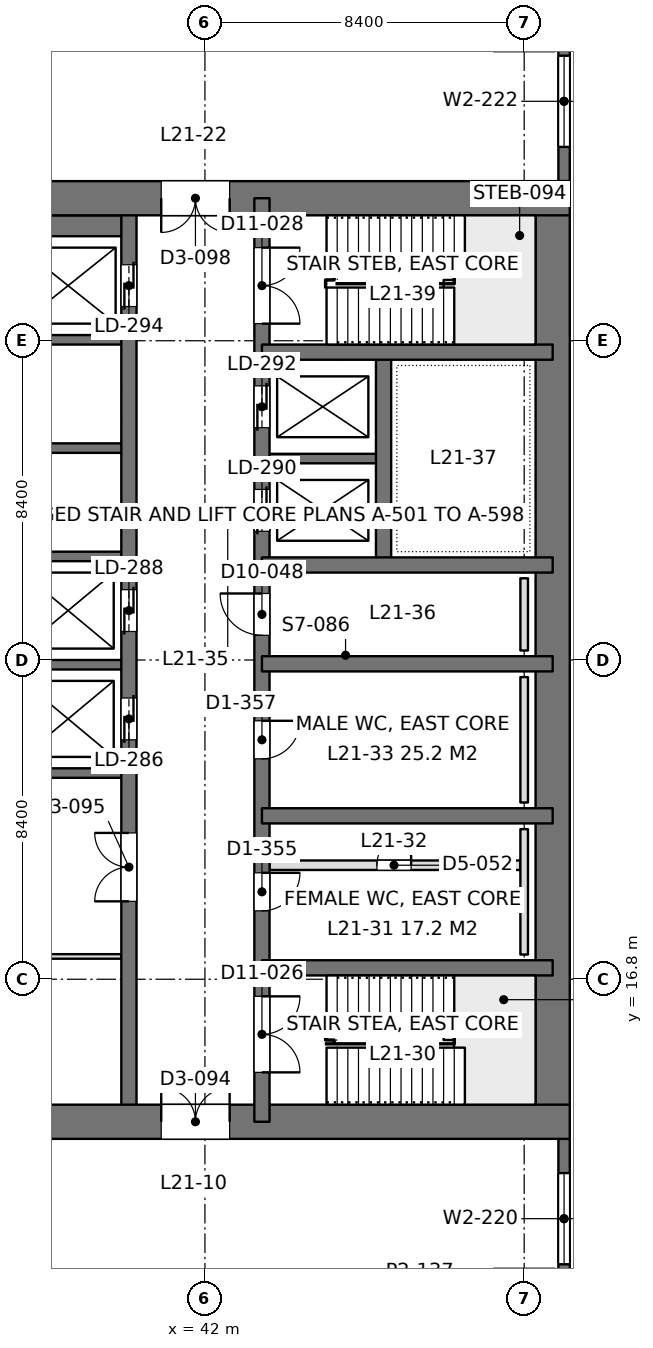
"""IFC4 building model, lengths in metres.
Left out: names, types, materials, properties, quantities, classifications, styles, units other than length and angle.
Written with IfcOpenShell. Run it as: python <this file> out.ifc"""

import sys

from ifc_helpers import new_model, si_unit, direction, frame, frame_2d, origin, place, context, subcontext, project, spatial, rectangle, extrude, element, fill, save


model = new_model("IFC4")
c1 = context("Model", 3, precision=1e-05, world=origin(), true_north=direction((0.0, 1.0)))
c2 = subcontext(c1, "Body", "Model", "MODEL_VIEW")
j1 = project(units=[si_unit("LENGTHUNIT", "METRE"), si_unit("PLANEANGLEUNIT", "RADIAN")], contexts=[c1])
p1 = place(None, origin())
s1 = spatial("IfcSite", under=j1, at=p1, CompositionType="ELEMENT")
p2 = place(p1, origin())
s2 = spatial("IfcBuilding", under=s1, at=p2, CompositionType="ELEMENT")
p3 = place(p2, frame((0.0, 0.0, 96.3)))
s3 = spatial("IfcBuildingStorey", under=s2, at=p3, CompositionType="ELEMENT", Elevation=96.3)
p4 = place(p3, frame((33.6, 13.05, 0.0), z_axis=(0.0, 0.0, 1.0), x_axis=(1.0, 0.0, 0.0)))
e1 = element("IfcWall", 1, at=p4, inside=s3, PredefinedType="SHEAR", context=c2, shape_type="SweptSolid", body=[
    extrude(rectangle(XDim=18.0, YDim=0.9, at=frame_2d((9.0, 0.0))), origin(), (0.0, 0.0, 1.0), 4.5),
])
p5 = place(p4, frame((7.25, 0.0, 0.0)))
e2 = element("IfcOpeningElement", 2, at=p5, cuts=e1, PredefinedType="OPENING", context=c2, shape_type="SweptSolid", body=[
    extrude(rectangle(XDim=1.8, YDim=2.4, at=frame_2d((0.9, 1.2))), frame((0.0, 0.46, 0.0), z_axis=(0.0, -1.0, 0.0), x_axis=(1.0, 0.0, 0.0)), (0.0, 0.0, 1.0), 0.92),
])
p6 = place(p3, frame((33.6, 37.35, 0.0), z_axis=(0.0, 0.0, 1.0), x_axis=(1.0, 0.0, 0.0)))
e3 = element("IfcWall", 3, at=p6, inside=s3, PredefinedType="SHEAR", context=c2, shape_type="SweptSolid", body=[
    extrude(rectangle(XDim=18.0, YDim=0.9, at=frame_2d((9.0, 0.0))), origin(), (0.0, 0.0, 1.0), 4.5),
])
p7 = place(p6, frame((7.25, 0.0, 0.0)))
e4 = element("IfcOpeningElement", 4, at=p7, cuts=e3, PredefinedType="OPENING", context=c2, shape_type="SweptSolid", body=[
    extrude(rectangle(XDim=1.8, YDim=2.4, at=frame_2d((0.9, 1.2))), frame((0.0, 0.46, 0.0), z_axis=(0.0, -1.0, 0.0), x_axis=(1.0, 0.0, 0.0)), (0.0, 0.0, 1.0), 0.92),
])
p8 = place(p3, frame((51.15, 13.05, 0.0), z_axis=(0.0, 0.0, 1.0), x_axis=(0.0, 1.0, 0.0)))
e5 = element("IfcWall", 5, at=p8, inside=s3, PredefinedType="SHEAR", context=c2, shape_type="SweptSolid", body=[
    extrude(rectangle(XDim=24.3, YDim=0.9, at=frame_2d((12.15, 0.0))), origin(), (0.0, 0.0, 1.0), 4.5),
])
p9 = place(p3, frame((43.5, 13.05, 0.0), z_axis=(0.0, 0.0, 1.0), x_axis=(0.0, 1.0, 0.0)))
e6 = element("IfcWall", 6, at=p9, inside=s3, PredefinedType="SHEAR", context=c2, shape_type="SweptSolid", body=[
    extrude(rectangle(XDim=24.3, YDim=0.4, at=frame_2d((12.15, 0.0))), origin(), (0.0, 0.0, 1.0), 4.5),
])
p10 = place(p9, frame((1.3, 0.0, 0.0)))
e7 = element("IfcOpeningElement", 7, at=p10, cuts=e6, PredefinedType="OPENING", context=c2, shape_type="SweptSolid", body=[
    extrude(rectangle(XDim=2.0, YDim=2.2, at=frame_2d((1.0, 1.1))), frame((0.0, 0.21, 0.0), z_axis=(0.0, -1.0, 0.0), x_axis=(1.0, 0.0, 0.0)), (0.0, 0.0, 1.0), 0.42),
])
p11 = place(p9, frame((21.0, 0.0, 0.0)))
e8 = element("IfcOpeningElement", 8, at=p11, cuts=e6, PredefinedType="OPENING", context=c2, shape_type="SweptSolid", body=[
    extrude(rectangle(XDim=2.0, YDim=2.2, at=frame_2d((1.0, 1.1))), frame((0.0, 0.21, 0.0), z_axis=(0.0, -1.0, 0.0), x_axis=(1.0, 0.0, 0.0)), (0.0, 0.0, 1.0), 0.42),
])
p12 = place(p9, frame((5.55, 0.0, 0.0)))
e9 = element("IfcOpeningElement", 9, at=p12, cuts=e6, PredefinedType="OPENING", context=c2, shape_type="SweptSolid", body=[
    extrude(rectangle(XDim=1.0, YDim=2.2, at=frame_2d((0.5, 1.1))), frame((0.0, 0.21, 0.0), z_axis=(0.0, -1.0, 0.0), x_axis=(1.0, 0.0, 0.0)), (0.0, 0.0, 1.0), 0.42),
])
p13 = place(p9, frame((9.55, 0.0, 0.0)))
e10 = element("IfcOpeningElement", 10, at=p13, cuts=e6, PredefinedType="OPENING", context=c2, shape_type="SweptSolid", body=[
    extrude(rectangle(XDim=1.0, YDim=2.2, at=frame_2d((0.5, 1.1))), frame((0.0, 0.21, 0.0), z_axis=(0.0, -1.0, 0.0), x_axis=(1.0, 0.0, 0.0)), (0.0, 0.0, 1.0), 0.42),
])
p14 = place(p9, frame((12.8, 0.0, 0.0)))
e11 = element("IfcOpeningElement", 11, at=p14, cuts=e6, PredefinedType="OPENING", context=c2, shape_type="SweptSolid", body=[
    extrude(rectangle(XDim=1.1, YDim=2.2, at=frame_2d((0.55, 1.1))), frame((0.0, 0.21, 0.0), z_axis=(0.0, -1.0, 0.0), x_axis=(1.0, 0.0, 0.0)), (0.0, 0.0, 1.0), 0.42),
])
p15 = place(p9, frame((15.538, 0.0, 0.0)))
e12 = element("IfcOpeningElement", 12, at=p15, cuts=e6, PredefinedType="OPENING", context=c2, shape_type="SweptSolid", body=[
    extrude(rectangle(XDim=1.1, YDim=2.2, at=frame_2d((0.55, 1.1))), frame((0.0, 0.21, 0.0), z_axis=(0.0, -1.0, 0.0), x_axis=(1.0, 0.0, 0.0)), (0.0, 0.0, 1.0), 0.42),
])
p16 = place(p9, frame((18.262, 0.0, 0.0)))
e13 = element("IfcOpeningElement", 13, at=p16, cuts=e6, PredefinedType="OPENING", context=c2, shape_type="SweptSolid", body=[
    extrude(rectangle(XDim=1.1, YDim=2.2, at=frame_2d((0.55, 1.1))), frame((0.0, 0.21, 0.0), z_axis=(0.0, -1.0, 0.0), x_axis=(1.0, 0.0, 0.0)), (0.0, 0.0, 1.0), 0.42),
])
p17 = place(p3, frame((40.0, 13.05, 0.0), z_axis=(0.0, 0.0, 1.0), x_axis=(0.0, 1.0, 0.0)))
e14 = element("IfcWall", 14, at=p17, inside=s3, PredefinedType="SHEAR", context=c2, shape_type="SweptSolid", body=[
    extrude(rectangle(XDim=24.3, YDim=0.4, at=frame_2d((12.15, 0.0))), origin(), (0.0, 0.0, 1.0), 4.5),
])
p18 = place(p17, frame((10.05, 0.0, 0.0)))
e15 = element("IfcOpeningElement", 15, at=p18, cuts=e14, PredefinedType="OPENING", context=c2, shape_type="SweptSolid", body=[
    extrude(rectangle(XDim=1.1, YDim=2.2, at=frame_2d((0.55, 1.1))), frame((0.0, 0.21, 0.0), z_axis=(0.0, -1.0, 0.0), x_axis=(1.0, 0.0, 0.0)), (0.0, 0.0, 1.0), 0.42),
])
p19 = place(p17, frame((12.9, 0.0, 0.0)))
e16 = element("IfcOpeningElement", 16, at=p19, cuts=e14, PredefinedType="OPENING", context=c2, shape_type="SweptSolid", body=[
    extrude(rectangle(XDim=1.1, YDim=2.2, at=frame_2d((0.55, 1.1))), frame((0.0, 0.21, 0.0), z_axis=(0.0, -1.0, 0.0), x_axis=(1.0, 0.0, 0.0)), (0.0, 0.0, 1.0), 0.42),
])
p20 = place(p17, frame((21.45, 0.0, 0.0)))
e17 = element("IfcOpeningElement", 17, at=p20, cuts=e14, PredefinedType="OPENING", context=c2, shape_type="SweptSolid", body=[
    extrude(rectangle(XDim=1.1, YDim=2.2, at=frame_2d((0.55, 1.1))), frame((0.0, 0.21, 0.0), z_axis=(0.0, -1.0, 0.0), x_axis=(1.0, 0.0, 0.0)), (0.0, 0.0, 1.0), 0.42),
])
p21 = place(p17, frame((5.8, 0.0, 0.0)))
e18 = element("IfcOpeningElement", 18, at=p21, cuts=e14, PredefinedType="OPENING", context=c2, shape_type="SweptSolid", body=[
    extrude(rectangle(XDim=1.8, YDim=2.4, at=frame_2d((0.9, 1.2))), frame((0.0, 0.21, 0.0), z_axis=(0.0, -1.0, 0.0), x_axis=(1.0, 0.0, 0.0)), (0.0, 0.0, 1.0), 0.42),
])
for number, where, z_axis, x_axis in (
    (19, (51.15, 17.1, 0.0), (0.0, 0.0, 1.0), (-1.0, 0.0, 0.0)),
    (20, (51.15, 21.1, 0.0), (0.0, 0.0, 1.0), (-1.0, 0.0, 0.0)),
    (21, (51.15, 25.1, 0.0), (0.0, 0.0, 1.0), (-1.0, 0.0, 0.0)),
    (22, (51.15, 27.7, 0.0), (0.0, 0.0, 1.0), (-1.0, 0.0, 0.0)),
    (23, (51.15, 33.3, 0.0), (0.0, 0.0, 1.0), (-1.0, 0.0, 0.0)),
):
    element("IfcWall", number, at=place(p3, frame(where, z_axis=z_axis, x_axis=x_axis)), inside=s3, PredefinedType="SHEAR", context=c2, shape_type="SweptSolid", body=[
        extrude(rectangle(XDim=7.65, YDim=0.4, at=frame_2d((3.825, 0.0))), origin(), (0.0, 0.0, 1.0), 4.5),
    ])
p22 = place(p3, frame((46.7, 27.7, 0.0), z_axis=(0.0, 0.0, 1.0), x_axis=(0.0, 1.0, 0.0)))
e24 = element("IfcWall", 24, at=p22, inside=s3, PredefinedType="SHEAR", context=c2, shape_type="SweptSolid", body=[
    extrude(rectangle(XDim=5.6, YDim=0.4, at=frame_2d((2.8, 0.0))), origin(), (0.0, 0.0, 1.0), 4.5),
])
p23 = place(p3, frame((46.7, 30.5, 0.0), z_axis=(0.0, 0.0, 1.0), x_axis=(-1.0, 0.0, 0.0)))
e25 = element("IfcWall", 25, at=p23, inside=s3, PredefinedType="SHEAR", context=c2, shape_type="SweptSolid", body=[
    extrude(rectangle(XDim=3.2, YDim=0.25, at=frame_2d((1.6, 0.0))), origin(), (0.0, 0.0, 1.0), 4.5),
])
p24 = place(p3, frame((40.0, 22.225, 0.0), z_axis=(0.0, 0.0, 1.0), x_axis=(-1.0, 0.0, 0.0)))
e26 = element("IfcWall", 26, at=p24, inside=s3, PredefinedType="SHEAR", context=c2, shape_type="SweptSolid", body=[
    extrude(rectangle(XDim=5.95, YDim=0.25, at=frame_2d((2.975, 0.0))), origin(), (0.0, 0.0, 1.0), 4.5),
])
for number, where, z_axis, x_axis in (
    (27, (40.0, 25.075, 0.0), (0.0, 0.0, 1.0), (-1.0, 0.0, 0.0)),
    (28, (40.0, 27.925, 0.0), (0.0, 0.0, 1.0), (-1.0, 0.0, 0.0)),
    (29, (40.0, 30.775, 0.0), (0.0, 0.0, 1.0), (-1.0, 0.0, 0.0)),
    (30, (40.0, 33.625, 0.0), (0.0, 0.0, 1.0), (-1.0, 0.0, 0.0)),
):
    element("IfcWall", number, at=place(p3, frame(where, z_axis=z_axis, x_axis=x_axis)), inside=s3, PredefinedType="SHEAR", context=c2, shape_type="SweptSolid", body=[
        extrude(rectangle(XDim=3.2, YDim=0.25, at=frame_2d((1.6, 0.0))), origin(), (0.0, 0.0, 1.0), 4.5),
    ])
p25 = place(p3, frame((40.0, 36.625, 0.0), z_axis=(0.0, 0.0, 1.0), x_axis=(-1.0, 0.0, 0.0)))
e31 = element("IfcWall", 31, at=p25, inside=s3, PredefinedType="SHEAR", context=c2, shape_type="SweptSolid", body=[
    extrude(rectangle(XDim=3.2, YDim=0.55, at=frame_2d((1.6, 0.0))), origin(), (0.0, 0.0, 1.0), 4.5),
])
p26 = place(p3, frame((51.45, 42.0, 0.0), z_axis=(0.0, 0.0, 1.0), x_axis=(0.0, -1.0, 0.0)))
e32 = element("IfcWall", 32, at=p26, inside=s3, PredefinedType="SOLIDWALL", context=c2, shape_type="SweptSolid", body=[
    extrude(rectangle(XDim=4.2, YDim=0.3, at=frame_2d((2.1, 0.0))), origin(), (0.0, 0.0, 1.0), 4.35),
])
p27 = place(p26, frame((0.9, 0.0, 0.9)))
e33 = element("IfcOpeningElement", 33, at=p27, cuts=e32, PredefinedType="OPENING", context=c2, shape_type="SweptSolid", body=[
    extrude(rectangle(XDim=2.4, YDim=1.9, at=frame_2d((1.2, 0.95))), frame((0.0, 0.16, 0.0), z_axis=(0.0, -1.0, 0.0), x_axis=(1.0, 0.0, 0.0)), (0.0, 0.0, 1.0), 0.32),
])
p28 = place(p3, frame((51.45, 12.6, 0.0), z_axis=(0.0, 0.0, 1.0), x_axis=(0.0, -1.0, 0.0)))
e34 = element("IfcWall", 34, at=p28, inside=s3, PredefinedType="SOLIDWALL", context=c2, shape_type="SweptSolid", body=[
    extrude(rectangle(XDim=4.2, YDim=0.3, at=frame_2d((2.1, 0.0))), origin(), (0.0, 0.0, 1.0), 4.35),
])
p29 = place(p28, frame((0.9, 0.0, 0.9)))
e35 = element("IfcOpeningElement", 35, at=p29, cuts=e34, PredefinedType="OPENING", context=c2, shape_type="SweptSolid", body=[
    extrude(rectangle(XDim=2.4, YDim=1.9, at=frame_2d((1.2, 0.95))), frame((0.0, 0.16, 0.0), z_axis=(0.0, -1.0, 0.0), x_axis=(1.0, 0.0, 0.0)), (0.0, 0.0, 1.0), 0.32),
])
p30 = place(p3, frame((33.898, 17.4, 0.0), z_axis=(0.0, 0.0, 1.0), x_axis=(1.0, 0.0, 0.0)))
e36 = element("IfcWall", 36, at=p30, inside=s3, PredefinedType="PARTITIONING", context=c2, shape_type="SweptSolid", body=[
    extrude(rectangle(XDim=5.904, YDim=0.12, at=frame_2d((2.952, 0.0))), origin(), (0.0, 0.0, 1.0), 3.85),
])
p31 = place(p3, frame((43.7, 19.8, 0.0), z_axis=(0.0, 0.0, 1.0), x_axis=(1.0, 0.0, 0.0)))
e37 = element("IfcWall", 37, at=p31, inside=s3, PredefinedType="PARTITIONING", context=c2, shape_type="SweptSolid", body=[
    extrude(rectangle(XDim=6.6, YDim=0.25, at=frame_2d((3.3, 0.0))), origin(), (0.0, 0.0, 1.0), 4.3),
])
p32 = place(p31, frame((2.825, 0.0, 0.0)))
e38 = element("IfcOpeningElement", 38, at=p32, cuts=e37, PredefinedType="OPENING", context=c2, shape_type="SweptSolid", body=[
    extrude(rectangle(XDim=0.9, YDim=2.2, at=frame_2d((0.45, 1.1))), frame((0.0, 0.135, 0.0), z_axis=(0.0, -1.0, 0.0), x_axis=(1.0, 0.0, 0.0)), (0.0, 0.0, 1.0), 0.27),
])
for number, where, z_axis, x_axis in (
    (39, (50.4, 17.45, 0.0), (0.0, 0.0, 1.0), (0.0, 1.0, 0.0)),
    (40, (50.4, 21.45, 0.0), (0.0, 0.0, 1.0), (0.0, 1.0, 0.0)),
):
    element("IfcWall", number, at=place(p3, frame(where, z_axis=z_axis, x_axis=x_axis)), inside=s3, PredefinedType="PLUMBINGWALL", context=c2, shape_type="SweptSolid", body=[
        extrude(rectangle(XDim=3.3, YDim=0.2, at=frame_2d((1.65, 0.0))), origin(), (0.0, 0.0, 1.0), 1.2),
    ])
p33 = place(p3, frame((50.4, 25.45, 0.0), z_axis=(0.0, 0.0, 1.0), x_axis=(0.0, 1.0, 0.0)))
e41 = element("IfcWall", 41, at=p33, inside=s3, PredefinedType="PLUMBINGWALL", context=c2, shape_type="SweptSolid", body=[
    extrude(rectangle(XDim=1.9, YDim=0.2, at=frame_2d((0.95, 0.0))), origin(), (0.0, 0.0, 1.0), 1.2),
])
p34 = place(p27, origin())
e42 = element("IfcWindow", 42, at=p34, inside=s3, PartitioningType="SINGLE_PANEL", PredefinedType="WINDOW", context=c2, shape_type="SweptSolid", body=[
    extrude(rectangle(XDim=2.4, YDim=1.9, at=frame_2d((1.2, 0.95))), frame((0.0, 0.03, 0.0), z_axis=(0.0, -1.0, 0.0), x_axis=(1.0, 0.0, 0.0)), (0.0, 0.0, 1.0), 0.06),
])
fill(e33, e42)
p35 = place(p29, origin())
e43 = element("IfcWindow", 43, at=p35, inside=s3, PartitioningType="SINGLE_PANEL", PredefinedType="WINDOW", context=c2, shape_type="SweptSolid", body=[
    extrude(rectangle(XDim=2.4, YDim=1.9, at=frame_2d((1.2, 0.95))), frame((0.0, 0.03, 0.0), z_axis=(0.0, -1.0, 0.0), x_axis=(1.0, 0.0, 0.0)), (0.0, 0.0, 1.0), 0.06),
])
fill(e35, e43)
p36 = place(p5, origin())
e44 = element("IfcDoor", 44, at=p36, inside=s3, OperationType="DOUBLE_DOOR_SINGLE_SWING", PredefinedType="DOOR", context=c2, shape_type="SweptSolid", body=[
    extrude(rectangle(XDim=1.8, YDim=2.4, at=frame_2d((0.9, 1.2))), frame((0.0, 0.025, 0.0), z_axis=(0.0, -1.0, 0.0), x_axis=(1.0, 0.0, 0.0)), (0.0, 0.0, 1.0), 0.05),
])
fill(e2, e44)
p37 = place(p7, frame((1.8, 0.0, 0.0), z_axis=(0.0, 0.0, 1.0), x_axis=(-1.0, 0.0, 0.0)))
e45 = element("IfcDoor", 45, at=p37, inside=s3, OperationType="DOUBLE_DOOR_SINGLE_SWING", PredefinedType="DOOR", context=c2, shape_type="SweptSolid", body=[
    extrude(rectangle(XDim=1.8, YDim=2.4, at=frame_2d((0.9, 1.2))), frame((0.0, 0.025, 0.0), z_axis=(0.0, -1.0, 0.0), x_axis=(1.0, 0.0, 0.0)), (0.0, 0.0, 1.0), 0.05),
])
fill(e4, e45)
p38 = place(p10, frame((2.0, 0.0, 0.0), z_axis=(0.0, 0.0, 1.0), x_axis=(-1.0, 0.0, 0.0)))
e46 = element("IfcDoor", 46, at=p38, inside=s3, OperationType="DOUBLE_DOOR_SINGLE_SWING", PredefinedType="DOOR", context=c2, shape_type="SweptSolid", body=[
    extrude(rectangle(XDim=2.0, YDim=2.2, at=frame_2d((1.0, 1.1))), frame((0.0, 0.025, 0.0), z_axis=(0.0, -1.0, 0.0), x_axis=(1.0, 0.0, 0.0)), (0.0, 0.0, 1.0), 0.05),
])
fill(e7, e46)
p39 = place(p11, frame((2.0, 0.0, 0.0), z_axis=(0.0, 0.0, 1.0), x_axis=(-1.0, 0.0, 0.0)))
e47 = element("IfcDoor", 47, at=p39, inside=s3, OperationType="DOUBLE_DOOR_SINGLE_SWING", PredefinedType="DOOR", context=c2, shape_type="SweptSolid", body=[
    extrude(rectangle(XDim=2.0, YDim=2.2, at=frame_2d((1.0, 1.1))), frame((0.0, 0.025, 0.0), z_axis=(0.0, -1.0, 0.0), x_axis=(1.0, 0.0, 0.0)), (0.0, 0.0, 1.0), 0.05),
])
fill(e8, e47)
p40 = place(p12, frame((1.0, 0.0, 0.0), z_axis=(0.0, 0.0, 1.0), x_axis=(-1.0, 0.0, 0.0)))
e48 = element("IfcDoor", 48, at=p40, inside=s3, OperationType="SINGLE_SWING_LEFT", PredefinedType="DOOR", context=c2, shape_type="SweptSolid", body=[
    extrude(rectangle(XDim=1.0, YDim=2.2, at=frame_2d((0.5, 1.1))), frame((0.0, 0.025, 0.0), z_axis=(0.0, -1.0, 0.0), x_axis=(1.0, 0.0, 0.0)), (0.0, 0.0, 1.0), 0.05),
])
fill(e9, e48)
p41 = place(p13, frame((1.0, 0.0, 0.0), z_axis=(0.0, 0.0, 1.0), x_axis=(-1.0, 0.0, 0.0)))
e49 = element("IfcDoor", 49, at=p41, inside=s3, OperationType="SINGLE_SWING_LEFT", PredefinedType="DOOR", context=c2, shape_type="SweptSolid", body=[
    extrude(rectangle(XDim=1.0, YDim=2.2, at=frame_2d((0.5, 1.1))), frame((0.0, 0.025, 0.0), z_axis=(0.0, -1.0, 0.0), x_axis=(1.0, 0.0, 0.0)), (0.0, 0.0, 1.0), 0.05),
])
fill(e10, e49)
p42 = place(p14, origin())
e50 = element("IfcDoor", 50, at=p42, inside=s3, OperationType="SINGLE_SWING_RIGHT", PredefinedType="DOOR", context=c2, shape_type="SweptSolid", body=[
    extrude(rectangle(XDim=1.1, YDim=2.2, at=frame_2d((0.55, 1.1))), frame((0.0, 0.025, 0.0), z_axis=(0.0, -1.0, 0.0), x_axis=(1.0, 0.0, 0.0)), (0.0, 0.0, 1.0), 0.05),
])
fill(e11, e50)
p43 = place(p18, origin())
e51 = element("IfcDoor", 51, at=p43, inside=s3, OperationType="DOUBLE_DOOR_SLIDING", PredefinedType="DOOR", context=c2, shape_type="SweptSolid", body=[
    extrude(rectangle(XDim=1.1, YDim=2.2, at=frame_2d((0.55, 1.1))), frame((0.0, 0.025, 0.0), z_axis=(0.0, -1.0, 0.0), x_axis=(1.0, 0.0, 0.0)), (0.0, 0.0, 1.0), 0.05),
])
fill(e15, e51)
p44 = place(p19, origin())
e52 = element("IfcDoor", 52, at=p44, inside=s3, OperationType="DOUBLE_DOOR_SLIDING", PredefinedType="DOOR", context=c2, shape_type="SweptSolid", body=[
    extrude(rectangle(XDim=1.1, YDim=2.2, at=frame_2d((0.55, 1.1))), frame((0.0, 0.025, 0.0), z_axis=(0.0, -1.0, 0.0), x_axis=(1.0, 0.0, 0.0)), (0.0, 0.0, 1.0), 0.05),
])
fill(e16, e52)
p45 = place(p20, origin())
e53 = element("IfcDoor", 53, at=p45, inside=s3, OperationType="DOUBLE_DOOR_SLIDING", PredefinedType="DOOR", context=c2, shape_type="SweptSolid", body=[
    extrude(rectangle(XDim=1.1, YDim=2.2, at=frame_2d((0.55, 1.1))), frame((0.0, 0.025, 0.0), z_axis=(0.0, -1.0, 0.0), x_axis=(1.0, 0.0, 0.0)), (0.0, 0.0, 1.0), 0.05),
])
fill(e17, e53)
p46 = place(p15, origin())
e54 = element("IfcDoor", 54, at=p46, inside=s3, OperationType="DOUBLE_DOOR_SLIDING", PredefinedType="DOOR", context=c2, shape_type="SweptSolid", body=[
    extrude(rectangle(XDim=1.1, YDim=2.2, at=frame_2d((0.55, 1.1))), frame((0.0, 0.025, 0.0), z_axis=(0.0, -1.0, 0.0), x_axis=(1.0, 0.0, 0.0)), (0.0, 0.0, 1.0), 0.05),
])
fill(e12, e54)
p47 = place(p16, origin())
e55 = element("IfcDoor", 55, at=p47, inside=s3, OperationType="DOUBLE_DOOR_SLIDING", PredefinedType="DOOR", context=c2, shape_type="SweptSolid", body=[
    extrude(rectangle(XDim=1.1, YDim=2.2, at=frame_2d((0.55, 1.1))), frame((0.0, 0.025, 0.0), z_axis=(0.0, -1.0, 0.0), x_axis=(1.0, 0.0, 0.0)), (0.0, 0.0, 1.0), 0.05),
])
fill(e13, e55)
p48 = place(p21, origin())
e56 = element("IfcDoor", 56, at=p48, inside=s3, OperationType="DOUBLE_DOOR_SINGLE_SWING", PredefinedType="DOOR", context=c2, shape_type="SweptSolid", body=[
    extrude(rectangle(XDim=1.8, YDim=2.4, at=frame_2d((0.9, 1.2))), frame((0.0, 0.025, 0.0), z_axis=(0.0, -1.0, 0.0), x_axis=(1.0, 0.0, 0.0)), (0.0, 0.0, 1.0), 0.05),
])
fill(e18, e56)
p49 = place(p32, origin())
e57 = element("IfcDoor", 57, at=p49, inside=s3, OperationType="SINGLE_SWING_RIGHT", PredefinedType="DOOR", context=c2, shape_type="SweptSolid", body=[
    extrude(rectangle(XDim=0.9, YDim=2.2, at=frame_2d((0.45, 1.1))), frame((0.0, 0.025, 0.0), z_axis=(0.0, -1.0, 0.0), x_axis=(1.0, 0.0, 0.0)), (0.0, 0.0, 1.0), 0.05),
])
fill(e38, e57)
save(model, sys.argv[1])
